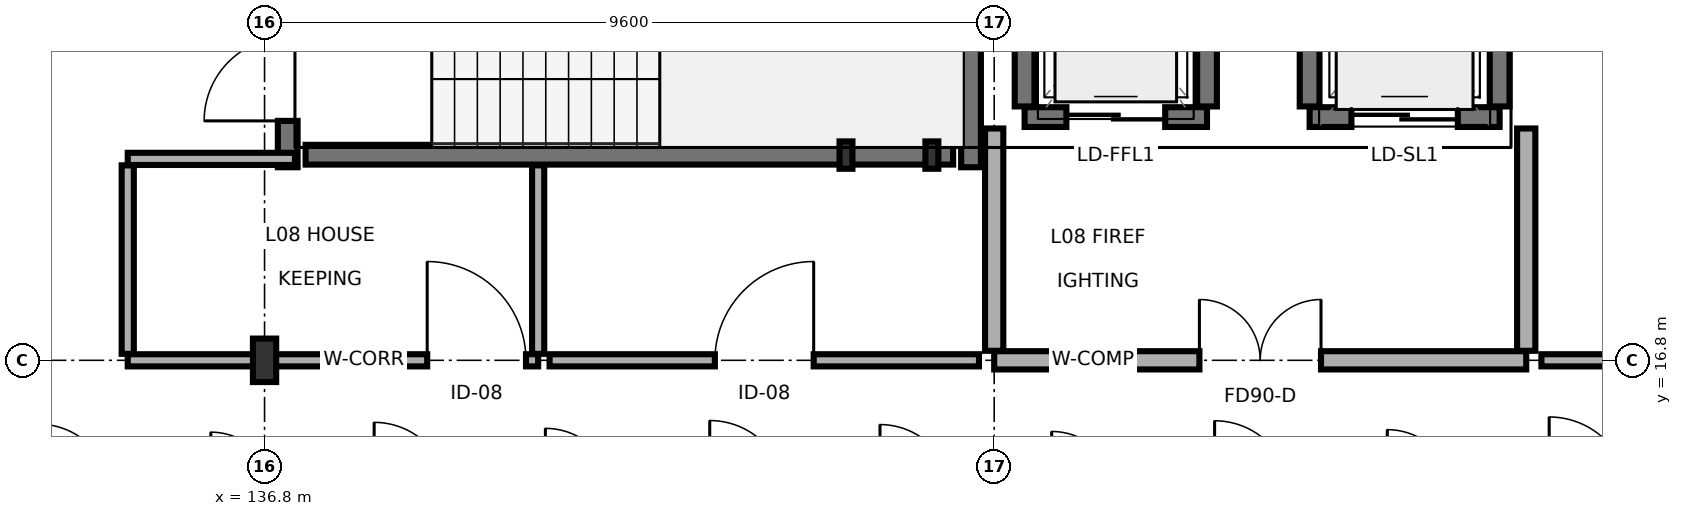
"""IFC4 building model, lengths in metres.
Left out: names, types, materials, properties, quantities, classifications, styles, units other than length and angle.
Written with IfcOpenShell. Run it as: python <this file> out.ifc"""

import sys

from ifc_helpers import new_model, si_unit, direction, frame, frame_2d, origin, origin_2d, place, context, subcontext, project, spatial, rectangle, i_section, extrude, element, fill, save


model = new_model("IFC4")
c1 = context("Model", 3, precision=1e-05, world=origin(), true_north=direction((0.0, 1.0)))
c2 = subcontext(c1, "Body", "Model", "MODEL_VIEW")
j1 = project(units=[si_unit("LENGTHUNIT", "METRE"), si_unit("PLANEANGLEUNIT", "RADIAN")], contexts=[c1])
p1 = place(None, origin())
s1 = spatial("IfcSite", under=j1, at=p1, CompositionType="ELEMENT")
p2 = place(p1, origin())
s2 = spatial("IfcBuilding", under=s1, at=p2, CompositionType="ELEMENT")
p3 = place(p2, frame((0.0, 0.0, 28.3)))
s3 = spatial("IfcBuildingStorey", under=s2, at=p3, CompositionType="ELEMENT", Elevation=28.3)
p4 = place(p3, frame((136.8, 16.8, 0.0), z_axis=(0.0, 0.0, 1.0), x_axis=(1.0, 0.0, 0.0)))
e1 = element("IfcColumn", 1, at=p4, inside=s3, PredefinedType="COLUMN", context=c2, shape_type="SweptSolid", body=[
    extrude(i_section(OverallWidth=0.306, OverallDepth=0.572, WebThickness=0.021, FlangeThickness=0.04, FilletRadius=0.027, at=origin_2d()), origin(), (0.0, 0.0, 1.0), 3.4),
])
for number, where, z_axis, x_axis in (
    (2, (144.45, 19.5, 0.0), (0.0, 0.0, 1.0), (1.0, 0.0, 0.0)),
    (3, (145.58, 19.5, 0.0), (0.0, 0.0, 1.0), (1.0, 0.0, 0.0)),
):
    element("IfcColumn", number, at=place(p3, frame(where, z_axis=z_axis, x_axis=x_axis)), inside=s3, PredefinedType="PILASTER", context=c2, shape_type="SweptSolid", body=[
        extrude(i_section(OverallWidth=0.17, OverallDepth=0.36, WebThickness=0.008, FlangeThickness=0.013, FilletRadius=0.018, at=origin_2d()), origin(), (0.0, 0.0, 1.0), 3.4),
    ])
p5 = place(p3, frame((137.105, 19.34, 0.0), z_axis=(0.0, 0.0, 1.0), x_axis=(0.0, 1.0, 0.0)))
e4 = element("IfcWall", 4, at=p5, inside=s3, PredefinedType="SHEAR", context=c2, shape_type="SweptSolid", body=[
    extrude(rectangle(XDim=4.27, YDim=0.26, at=frame_2d((2.135, 0.0))), origin(), (0.0, 0.0, 1.0), 3.175),
])
p6 = place(p5, frame((0.61, 0.0, 0.0)))
e5 = element("IfcOpeningElement", 5, at=p6, cuts=e4, PredefinedType="OPENING", context=c2, shape_type="SweptSolid", body=[
    extrude(rectangle(XDim=1.1, YDim=2.2, at=frame_2d((0.55, 1.1))), frame((0.0, 0.14, 0.0), z_axis=(0.0, -1.0, 0.0), x_axis=(1.0, 0.0, 0.0)), (0.0, 0.0, 1.0), 0.28),
])
p7 = place(p3, frame((146.095, 19.34, 0.0), z_axis=(0.0, 0.0, 1.0), x_axis=(0.0, 1.0, 0.0)))
e6 = element("IfcWall", 6, at=p7, inside=s3, PredefinedType="SHEAR", context=c2, shape_type="SweptSolid", body=[
    extrude(rectangle(XDim=4.27, YDim=0.26, at=frame_2d((2.135, 0.0))), origin(), (0.0, 0.0, 1.0), 3.175),
])
p8 = place(p3, frame((137.34, 19.505, 0.0), z_axis=(0.0, 0.0, 1.0), x_axis=(1.0, 0.0, 0.0)))
e7 = element("IfcWall", 7, at=p8, inside=s3, PredefinedType="SHEAR", context=c2, shape_type="SweptSolid", body=[
    extrude(rectangle(XDim=8.52, YDim=0.26, at=frame_2d((4.26, 0.0))), origin(), (0.0, 0.0, 1.0), 3.175),
])
p9 = place(p3, frame((146.8, 20.0, 0.0), z_axis=(0.0, 0.0, 1.0), x_axis=(1.0, 0.0, 0.0)))
e8 = element("IfcWall", 8, at=p9, inside=s3, PredefinedType="SHEAR", context=c2, shape_type="SweptSolid", body=[
    extrude(rectangle(XDim=2.4, YDim=0.26, at=frame_2d((1.2, 0.0))), origin(), (0.0, 0.0, 1.0), 3.175),
])
p10 = place(p9, frame((0.55, 0.0, 0.0)))
e9 = element("IfcOpeningElement", 9, at=p10, cuts=e8, PredefinedType="OPENING", context=c2, shape_type="SweptSolid", body=[
    extrude(rectangle(XDim=1.3, YDim=2.25, at=frame_2d((0.65, 1.125))), frame((0.0, 0.14, 0.0), z_axis=(0.0, -1.0, 0.0), x_axis=(1.0, 0.0, 0.0)), (0.0, 0.0, 1.0), 0.28),
])
for number, where, z_axis, x_axis in (
    (10, (146.8, 20.14, 0.0), (0.0, 0.0, 1.0), (0.0, 1.0, 0.0)),
    (11, (149.2, 20.14, 0.0), (0.0, 0.0, 1.0), (0.0, 1.0, 0.0)),
):
    element("IfcWall", number, at=place(p3, frame(where, z_axis=z_axis, x_axis=x_axis)), inside=s3, PredefinedType="SHEAR", context=c2, shape_type="SweptSolid", body=[
        extrude(rectangle(XDim=2.52, YDim=0.26, at=frame_2d((1.26, 0.0))), origin(), (0.0, 0.0, 1.0), 3.175),
    ])
p11 = place(p3, frame((150.55, 20.0, 0.0), z_axis=(0.0, 0.0, 1.0), x_axis=(1.0, 0.0, 0.0)))
e12 = element("IfcWall", 12, at=p11, inside=s3, PredefinedType="SHEAR", context=c2, shape_type="SweptSolid", body=[
    extrude(rectangle(XDim=2.5, YDim=0.26, at=frame_2d((1.25, 0.0))), origin(), (0.0, 0.0, 1.0), 3.175),
])
p12 = place(p11, frame((0.55, 0.0, 0.0)))
e13 = element("IfcOpeningElement", 13, at=p12, cuts=e12, PredefinedType="OPENING", context=c2, shape_type="SweptSolid", body=[
    extrude(rectangle(XDim=1.4, YDim=2.3, at=frame_2d((0.7, 1.15))), frame((0.0, 0.14, 0.0), z_axis=(0.0, -1.0, 0.0), x_axis=(1.0, 0.0, 0.0)), (0.0, 0.0, 1.0), 0.28),
])
for number, where, z_axis, x_axis in (
    (14, (150.55, 20.14, 0.0), (0.0, 0.0, 1.0), (0.0, 1.0, 0.0)),
    (15, (153.05, 20.14, 0.0), (0.0, 0.0, 1.0), (0.0, 1.0, 0.0)),
):
    element("IfcWall", number, at=place(p3, frame(where, z_axis=z_axis, x_axis=x_axis)), inside=s3, PredefinedType="SHEAR", context=c2, shape_type="SweptSolid", body=[
        extrude(rectangle(XDim=2.52, YDim=0.26, at=frame_2d((1.26, 0.0))), origin(), (0.0, 0.0, 1.0), 3.175),
    ])
p13 = place(p3, frame((146.4, 16.8, 0.0), z_axis=(0.0, 0.0, 1.0), x_axis=(1.0, 0.0, 0.0)))
e16 = element("IfcWall", 16, at=p13, inside=s3, PredefinedType="SOLIDWALL", context=c2, shape_type="SweptSolid", body=[
    extrude(rectangle(XDim=7.0, YDim=0.24, at=frame_2d((3.5, 0.0))), origin(), (0.0, 0.0, 1.0), 2.71),
])
p14 = place(p13, frame((2.7, 0.0, 0.0)))
e17 = element("IfcOpeningElement", 17, at=p14, cuts=e16, PredefinedType="OPENING", context=c2, shape_type="SweptSolid", body=[
    extrude(rectangle(XDim=1.6, YDim=2.2, at=frame_2d((0.8, 1.1))), frame((0.0, 0.13, 0.0), z_axis=(0.0, -1.0, 0.0), x_axis=(1.0, 0.0, 0.0)), (0.0, 0.0, 1.0), 0.26),
])
for number, where, z_axis, x_axis in (
    (18, (146.4, 16.925, 0.0), (0.0, 0.0, 1.0), (0.0, 1.0, 0.0)),
    (19, (153.4, 16.925, 0.0), (0.0, 0.0, 1.0), (0.0, 1.0, 0.0)),
):
    element("IfcWall", number, at=place(p3, frame(where, z_axis=z_axis, x_axis=x_axis)), inside=s3, PredefinedType="SOLIDWALL", context=c2, shape_type="SweptSolid", body=[
        extrude(rectangle(XDim=2.925, YDim=0.24, at=frame_2d((1.462, 0.0))), origin(), (0.0, 0.0, 1.0), 2.71),
    ])
p15 = place(p3, frame((135.0, 16.8, 0.0), z_axis=(0.0, 0.0, 1.0), x_axis=(1.0, 0.0, 0.0)))
e20 = element("IfcWall", 20, at=p15, inside=s3, PredefinedType="PARTITIONING", context=c2, shape_type="SweptSolid", body=[
    extrude(rectangle(XDim=5.4, YDim=0.16, at=frame_2d((2.7, 0.0))), origin(), (0.0, 0.0, 1.0), 2.71),
])
p16 = place(p15, frame((3.94, 0.0, 0.0)))
e21 = element("IfcOpeningElement", 21, at=p16, cuts=e20, PredefinedType="OPENING", context=c2, shape_type="SweptSolid", body=[
    extrude(rectangle(XDim=1.3, YDim=2.2, at=frame_2d((0.65, 1.1))), frame((0.0, 0.09, 0.0), z_axis=(0.0, -1.0, 0.0), x_axis=(1.0, 0.0, 0.0)), (0.0, 0.0, 1.0), 0.18),
])
for number, where, z_axis, x_axis in (
    (22, (135.0, 16.885, 0.0), (0.0, 0.0, 1.0), (0.0, 1.0, 0.0)),
    (23, (140.4, 16.885, 0.0), (0.0, 0.0, 1.0), (0.0, 1.0, 0.0)),
):
    element("IfcWall", number, at=place(p3, frame(where, z_axis=z_axis, x_axis=x_axis)), inside=s3, PredefinedType="PARTITIONING", context=c2, shape_type="SweptSolid", body=[
        extrude(rectangle(XDim=2.48, YDim=0.16, at=frame_2d((1.24, 0.0))), origin(), (0.0, 0.0, 1.0), 2.71),
    ])
p17 = place(p3, frame((135.0, 19.45, 0.0), z_axis=(0.0, 0.0, 1.0), x_axis=(1.0, 0.0, 0.0)))
e24 = element("IfcWall", 24, at=p17, inside=s3, PredefinedType="PARTITIONING", context=c2, shape_type="SweptSolid", body=[
    extrude(rectangle(XDim=2.2, YDim=0.16, at=frame_2d((1.1, 0.0))), origin(), (0.0, 0.0, 1.0), 2.71),
])
p18 = place(p3, frame((140.55, 16.8, 0.0), z_axis=(0.0, 0.0, 1.0), x_axis=(1.0, 0.0, 0.0)))
e25 = element("IfcWall", 25, at=p18, inside=s3, PredefinedType="PARTITIONING", context=c2, shape_type="SweptSolid", body=[
    extrude(rectangle(XDim=5.65, YDim=0.16, at=frame_2d((2.825, 0.0))), origin(), (0.0, 0.0, 1.0), 2.71),
])
p19 = place(p18, frame((2.175, 0.0, 0.0)))
e26 = element("IfcOpeningElement", 26, at=p19, cuts=e25, PredefinedType="OPENING", context=c2, shape_type="SweptSolid", body=[
    extrude(rectangle(XDim=1.3, YDim=2.2, at=frame_2d((0.65, 1.1))), frame((0.0, 0.09, 0.0), z_axis=(0.0, -1.0, 0.0), x_axis=(1.0, 0.0, 0.0)), (0.0, 0.0, 1.0), 0.18),
])
p20 = place(p3, frame((153.6, 16.8, 0.0), z_axis=(0.0, 0.0, 1.0), x_axis=(1.0, 0.0, 0.0)))
e27 = element("IfcWall", 27, at=p20, inside=s3, PredefinedType="PARTITIONING", context=c2, shape_type="SweptSolid", body=[
    extrude(rectangle(XDim=1.8, YDim=0.16, at=frame_2d((0.9, 0.0))), origin(), (0.0, 0.0, 1.0), 2.71),
])
p21 = place(p6, origin())
e28 = element("IfcDoor", 28, at=p21, inside=s3, OperationType="SINGLE_SWING_LEFT", PredefinedType="DOOR", context=c2, shape_type="SweptSolid", body=[
    extrude(rectangle(XDim=1.1, YDim=2.2, at=frame_2d((0.55, 1.1))), frame((0.0, 0.025, 0.0), z_axis=(0.0, -1.0, 0.0), x_axis=(1.0, 0.0, 0.0)), (0.0, 0.0, 1.0), 0.05),
])
fill(e5, e28)
p22 = place(p10, origin())
e29 = element("IfcDoor", 29, at=p22, inside=s3, OperationType="SLIDING_TO_RIGHT", PredefinedType="DOOR", context=c2, shape_type="SweptSolid", body=[
    extrude(rectangle(XDim=1.3, YDim=2.25, at=frame_2d((0.65, 1.125))), frame((0.0, 0.025, 0.0), z_axis=(0.0, -1.0, 0.0), x_axis=(1.0, 0.0, 0.0)), (0.0, 0.0, 1.0), 0.05),
])
fill(e9, e29)
p23 = place(p12, origin())
e30 = element("IfcDoor", 30, at=p23, inside=s3, OperationType="SLIDING_TO_LEFT", PredefinedType="DOOR", context=c2, shape_type="SweptSolid", body=[
    extrude(rectangle(XDim=1.4, YDim=2.3, at=frame_2d((0.7, 1.15))), frame((0.0, 0.025, 0.0), z_axis=(0.0, -1.0, 0.0), x_axis=(1.0, 0.0, 0.0)), (0.0, 0.0, 1.0), 0.05),
])
fill(e13, e30)
p24 = place(p14, origin())
e31 = element("IfcDoor", 31, at=p24, inside=s3, OperationType="DOUBLE_DOOR_SINGLE_SWING", PredefinedType="DOOR", context=c2, shape_type="SweptSolid", body=[
    extrude(rectangle(XDim=1.6, YDim=2.2, at=frame_2d((0.8, 1.1))), frame((0.0, 0.025, 0.0), z_axis=(0.0, -1.0, 0.0), x_axis=(1.0, 0.0, 0.0)), (0.0, 0.0, 1.0), 0.05),
])
fill(e17, e31)
p25 = place(p16, origin())
e32 = element("IfcDoor", 32, at=p25, inside=s3, OperationType="SINGLE_SWING_LEFT", PredefinedType="DOOR", context=c2, shape_type="SweptSolid", body=[
    extrude(rectangle(XDim=1.3, YDim=2.2, at=frame_2d((0.65, 1.1))), frame((0.0, 0.025, 0.0), z_axis=(0.0, -1.0, 0.0), x_axis=(1.0, 0.0, 0.0)), (0.0, 0.0, 1.0), 0.05),
])
fill(e21, e32)
p26 = place(p19, origin())
e33 = element("IfcDoor", 33, at=p26, inside=s3, OperationType="SINGLE_SWING_RIGHT", PredefinedType="DOOR", context=c2, shape_type="SweptSolid", body=[
    extrude(rectangle(XDim=1.3, YDim=2.2, at=frame_2d((0.65, 1.1))), frame((0.0, 0.025, 0.0), z_axis=(0.0, -1.0, 0.0), x_axis=(1.0, 0.0, 0.0)), (0.0, 0.0, 1.0), 0.05),
])
fill(e26, e33)
save(model, sys.argv[1])
